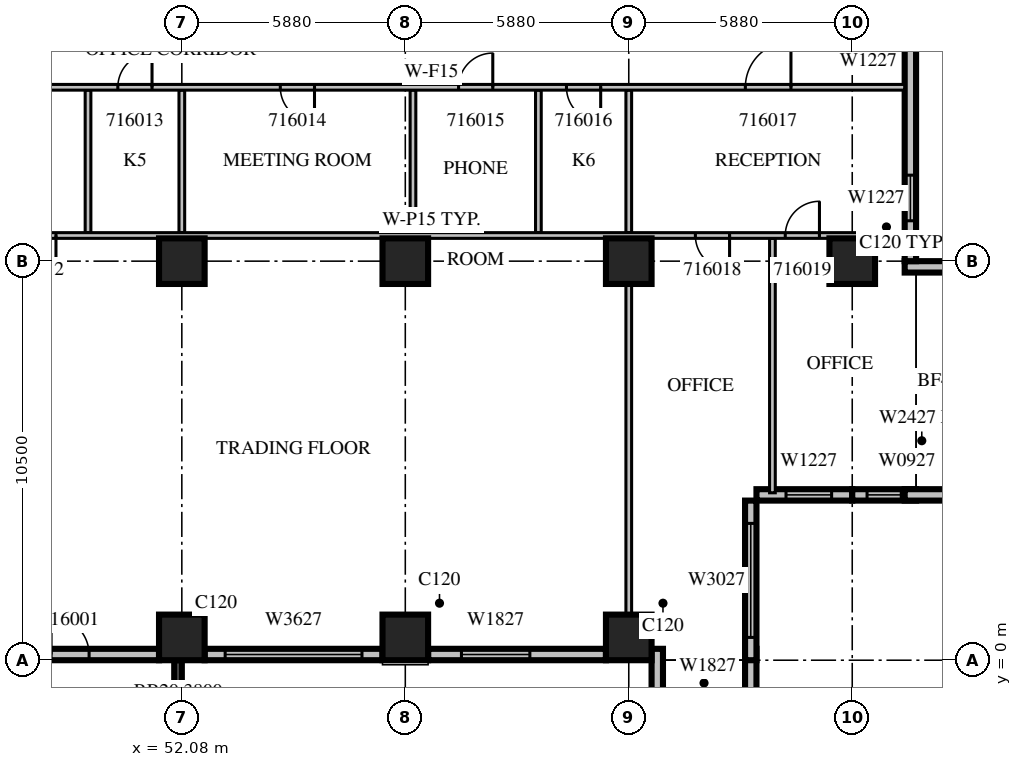
"""IFC4 building model, lengths in metres.
Left out: names, types, materials, properties, quantities, classifications, styles, units other than length and angle.
Written with IfcOpenShell. Run it as: python <this file> out.ifc"""

import sys

from ifc_helpers import new_model, si_unit, direction, frame, frame_2d, origin, origin_2d, place, context, subcontext, project, spatial, rectangle, extrude, source, transform, mapped, element, fill, save


model = new_model("IFC4")
c1 = context("Model", 3, precision=1e-05, world=origin(), true_north=direction((0.0, 1.0)))
c2 = subcontext(c1, "Body", "Model", "MODEL_VIEW")
j1 = project(units=[si_unit("LENGTHUNIT", "METRE"), si_unit("PLANEANGLEUNIT", "RADIAN")], contexts=[c1])
p1 = place(None, origin())
s1 = spatial("IfcSite", under=j1, at=p1, CompositionType="ELEMENT")
p2 = place(p1, origin())
s2 = spatial("IfcBuilding", under=s1, at=p2, CompositionType="ELEMENT")
p3 = place(p2, frame((0.0, 0.0, 78.3)))
s3 = spatial("IfcBuildingStorey", under=s2, at=p3, CompositionType="ELEMENT", Elevation=78.3)
m1 = source(origin(), c2, "Body", "SweptSolid", [
    extrude(rectangle(XDim=1.2, YDim=1.2, at=origin_2d()), origin(), (0.0, 0.0, 1.0), 4.2),
])
for number, where, z_axis, x_axis in (
    (1, (52.08, 0.6, 0.0), (0.0, 0.0, 1.0), (1.0, 0.0, 0.0)),
    (2, (57.96, 0.6, 0.0), (0.0, 0.0, 1.0), (1.0, 0.0, 0.0)),
    (3, (63.84, 0.6, 0.0), (0.0, 0.0, 1.0), (1.0, 0.0, 0.0)),
    (4, (52.08, 10.5, 0.0), (0.0, 0.0, 1.0), (1.0, 0.0, 0.0)),
    (5, (57.96, 10.5, 0.0), (0.0, 0.0, 1.0), (1.0, 0.0, 0.0)),
    (6, (63.84, 10.5, 0.0), (0.0, 0.0, 1.0), (1.0, 0.0, 0.0)),
    (7, (69.72, 10.5, 0.0), (0.0, 0.0, 1.0), (1.0, 0.0, 0.0)),
):
    element("IfcColumn", number, at=place(p3, frame(where, z_axis=z_axis, x_axis=x_axis)), inside=s3, PredefinedType="COLUMN", context=c2, shape_type="MappedRepresentation", body=[
        mapped(m1, transform((0.0, 0.0, 0.0), scale=1.0)),
    ])
m2 = source(origin(), c2, "Body", "SweptSolid", [
    extrude(rectangle(XDim=3.9, YDim=0.2, at=frame_2d((1.95, 0.0))), origin(), (0.0, 0.0, 1.0), 3.8),
])
p4 = place(p3, frame((51.98, 0.0, 0.0), z_axis=(0.0, 0.0, 1.0), x_axis=(0.0, -1.0, 0.0)))
e8 = element("IfcWall", 8, at=p4, inside=s3, PredefinedType="SOLIDWALL", context=c2, shape_type="MappedRepresentation", body=[
    mapped(m2, transform((0.0, 0.0, 0.0), scale=1.0)),
])
m3 = source(origin(), c2, "Body", "SweptSolid", [
    extrude(rectangle(XDim=2.4, YDim=2.7, at=frame_2d((1.2, 1.35))), frame((0.0, 0.11, 0.0), z_axis=(0.0, -1.0, 0.0), x_axis=(1.0, 0.0, 0.0)), (0.0, 0.0, 1.0), 0.22),
])
p5 = place(p4, frame((0.75, 0.0, 0.6)))
e9 = element("IfcOpeningElement", 9, at=p5, cuts=e8, PredefinedType="OPENING", context=c2, shape_type="MappedRepresentation", body=[
    mapped(m3, transform((0.0, 0.0, 0.0), scale=1.0)),
])
m4 = source(origin(), c2, "Body", "SweptSolid", [
    extrude(rectangle(XDim=4.68, YDim=0.3, at=frame_2d((2.34, 0.0))), origin(), (0.0, 0.0, 1.0), 3.8),
])
p6 = place(p3, frame((46.8, 0.15, 0.0), z_axis=(0.0, 0.0, 1.0), x_axis=(1.0, 0.0, 0.0)))
e10 = element("IfcWall", 10, at=p6, inside=s3, PredefinedType="STANDARD", context=c2, shape_type="MappedRepresentation", body=[
    mapped(m4, transform((0.0, 0.0, 0.0), scale=1.0)),
])
m5 = source(origin(), c2, "Body", "SweptSolid", [
    extrude(rectangle(XDim=1.0, YDim=2.1, at=frame_2d((0.5, 1.05))), frame((0.0, 0.16, 0.0), z_axis=(0.0, -1.0, 0.0), x_axis=(1.0, 0.0, 0.0)), (0.0, 0.0, 1.0), 0.32),
])
p7 = place(p6, frame((1.84, 0.0, 0.0)))
e11 = element("IfcOpeningElement", 11, at=p7, cuts=e10, PredefinedType="OPENING", context=c2, shape_type="MappedRepresentation", body=[
    mapped(m5, transform((0.0, 0.0, 0.0), scale=1.0)),
])
p8 = place(p3, frame((52.68, 0.15, 0.0), z_axis=(0.0, 0.0, 1.0), x_axis=(1.0, 0.0, 0.0)))
e12 = element("IfcWall", 12, at=p8, inside=s3, PredefinedType="STANDARD", context=c2, shape_type="MappedRepresentation", body=[
    mapped(m4, transform((0.0, 0.0, 0.0), scale=1.0)),
])
m6 = source(origin(), c2, "Body", "SweptSolid", [
    extrude(rectangle(XDim=3.6, YDim=2.7, at=frame_2d((1.8, 1.35))), frame((0.0, 0.16, 0.0), z_axis=(0.0, -1.0, 0.0), x_axis=(1.0, 0.0, 0.0)), (0.0, 0.0, 1.0), 0.32),
])
p9 = place(p8, frame((0.54, 0.0, 0.6)))
e13 = element("IfcOpeningElement", 13, at=p9, cuts=e12, PredefinedType="OPENING", context=c2, shape_type="MappedRepresentation", body=[
    mapped(m6, transform((0.0, 0.0, 0.0), scale=1.0)),
])
p10 = place(p3, frame((58.56, 0.15, 0.0), z_axis=(0.0, 0.0, 1.0), x_axis=(1.0, 0.0, 0.0)))
e14 = element("IfcWall", 14, at=p10, inside=s3, PredefinedType="STANDARD", context=c2, shape_type="MappedRepresentation", body=[
    mapped(m4, transform((0.0, 0.0, 0.0), scale=1.0)),
])
m7 = source(origin(), c2, "Body", "SweptSolid", [
    extrude(rectangle(XDim=1.8, YDim=2.7, at=frame_2d((0.9, 1.35))), frame((0.0, 0.16, 0.0), z_axis=(0.0, -1.0, 0.0), x_axis=(1.0, 0.0, 0.0)), (0.0, 0.0, 1.0), 0.32),
])
p11 = place(p10, frame((0.877, 0.0, 0.6)))
e15 = element("IfcOpeningElement", 15, at=p11, cuts=e14, PredefinedType="OPENING", context=c2, shape_type="MappedRepresentation", body=[
    mapped(m7, transform((0.0, 0.0, 0.0), scale=1.0)),
])
m8 = source(origin(), c2, "Body", "SweptSolid", [
    extrude(rectangle(XDim=1.2, YDim=0.3, at=frame_2d((0.6, 0.0))), origin(), (0.0, 0.0, 1.0), 3.8),
])
for number, where, z_axis, x_axis in (
    (16, (64.59, 0.3, 0.0), (0.0, 0.0, 1.0), (0.0, -1.0, 0.0)),
    (17, (67.05, 0.3, 0.0), (0.0, 0.0, 1.0), (0.0, -1.0, 0.0)),
):
    element("IfcWall", number, at=place(p3, frame(where, z_axis=z_axis, x_axis=x_axis)), inside=s3, PredefinedType="STANDARD", context=c2, shape_type="MappedRepresentation", body=[
        mapped(m8, transform((0.0, 0.0, 0.0), scale=1.0)),
    ])
m9 = source(origin(), c2, "Body", "SweptSolid", [
    extrude(rectangle(XDim=4.2, YDim=0.3, at=frame_2d((2.1, 0.0))), origin(), (0.0, 0.0, 1.0), 3.8),
])
p12 = place(p3, frame((67.05, 0.0, 0.0), z_axis=(0.0, 0.0, 1.0), x_axis=(0.0, 1.0, 0.0)))
e18 = element("IfcWall", 18, at=p12, inside=s3, PredefinedType="STANDARD", context=c2, shape_type="MappedRepresentation", body=[
    mapped(m9, transform((0.0, 0.0, 0.0), scale=1.0)),
])
m10 = source(origin(), c2, "Body", "SweptSolid", [
    extrude(rectangle(XDim=3.0, YDim=2.7, at=frame_2d((1.5, 1.35))), frame((0.0, 0.16, 0.0), z_axis=(0.0, -1.0, 0.0), x_axis=(1.0, 0.0, 0.0)), (0.0, 0.0, 1.0), 0.32),
])
p13 = place(p12, frame((0.6, 0.0, 0.6)))
e19 = element("IfcOpeningElement", 19, at=p13, cuts=e18, PredefinedType="OPENING", context=c2, shape_type="MappedRepresentation", body=[
    mapped(m10, transform((0.0, 0.0, 0.0), scale=1.0)),
])
m11 = source(origin(), c2, "Body", "SweptSolid", [
    extrude(rectangle(XDim=2.52, YDim=0.3, at=frame_2d((1.26, 0.0))), origin(), (0.0, 0.0, 1.0), 3.8),
])
p14 = place(p3, frame((67.2, 4.35, 0.0), z_axis=(0.0, 0.0, 1.0), x_axis=(1.0, 0.0, 0.0)))
e20 = element("IfcWall", 20, at=p14, inside=s3, PredefinedType="STANDARD", context=c2, shape_type="MappedRepresentation", body=[
    mapped(m11, transform((0.0, 0.0, 0.0), scale=1.0)),
])
m12 = source(origin(), c2, "Body", "SweptSolid", [
    extrude(rectangle(XDim=1.2, YDim=2.7, at=frame_2d((0.6, 1.35))), frame((0.0, 0.16, 0.0), z_axis=(0.0, -1.0, 0.0), x_axis=(1.0, 0.0, 0.0)), (0.0, 0.0, 1.0), 0.32),
])
p15 = place(p14, frame((0.777, 0.0, 0.6)))
e21 = element("IfcOpeningElement", 21, at=p15, cuts=e20, PredefinedType="OPENING", context=c2, shape_type="MappedRepresentation", body=[
    mapped(m12, transform((0.0, 0.0, 0.0), scale=1.0)),
])
m13 = source(origin(), c2, "Body", "SweptSolid", [
    extrude(rectangle(XDim=1.68, YDim=0.3, at=frame_2d((0.84, 0.0))), origin(), (0.0, 0.0, 1.0), 3.8),
])
p16 = place(p3, frame((69.72, 4.35, 0.0), z_axis=(0.0, 0.0, 1.0), x_axis=(1.0, 0.0, 0.0)))
e22 = element("IfcWall", 22, at=p16, inside=s3, PredefinedType="STANDARD", context=c2, shape_type="MappedRepresentation", body=[
    mapped(m13, transform((0.0, 0.0, 0.0), scale=1.0)),
])
m14 = source(origin(), c2, "Body", "SweptSolid", [
    extrude(rectangle(XDim=0.9, YDim=2.7, at=frame_2d((0.45, 1.35))), frame((0.0, 0.16, 0.0), z_axis=(0.0, -1.0, 0.0), x_axis=(1.0, 0.0, 0.0)), (0.0, 0.0, 1.0), 0.32),
])
p17 = place(p16, frame((0.39, 0.0, 0.6)))
e23 = element("IfcOpeningElement", 23, at=p17, cuts=e22, PredefinedType="OPENING", context=c2, shape_type="MappedRepresentation", body=[
    mapped(m14, transform((0.0, 0.0, 0.0), scale=1.0)),
])
for number, where, z_axis, x_axis in (
    (24, (71.1, 4.35, 0.0), (0.0, 0.0, 1.0), (1.0, 0.0, 0.0)),
    (25, (71.1, 10.35, 0.0), (0.0, 0.0, 1.0), (1.0, 0.0, 0.0)),
):
    element("IfcWall", number, at=place(p3, frame(where, z_axis=z_axis, x_axis=x_axis)), inside=s3, PredefinedType="STANDARD", context=c2, shape_type="MappedRepresentation", body=[
        mapped(m8, transform((0.0, 0.0, 0.0), scale=1.0)),
    ])
m15 = source(origin(), c2, "Body", "SweptSolid", [
    extrude(rectangle(XDim=6.3, YDim=0.3, at=frame_2d((3.15, 0.0))), origin(), (0.0, 0.0, 1.0), 3.8),
])
p18 = place(p3, frame((71.25, 10.5, 0.0), z_axis=(0.0, 0.0, 1.0), x_axis=(0.0, 1.0, 0.0)))
e26 = element("IfcWall", 26, at=p18, inside=s3, PredefinedType="STANDARD", context=c2, shape_type="MappedRepresentation", body=[
    mapped(m15, transform((0.0, 0.0, 0.0), scale=1.0)),
])
p19 = place(p18, frame((1.062, 0.0, 0.6)))
e27 = element("IfcOpeningElement", 27, at=p19, cuts=e26, PredefinedType="OPENING", context=c2, shape_type="MappedRepresentation", body=[
    mapped(m12, transform((0.0, 0.0, 0.0), scale=1.0)),
])
m16 = source(origin(), c2, "Body", "SweptSolid", [
    extrude(rectangle(XDim=3.75, YDim=0.15, at=frame_2d((1.875, 0.0))), origin(), (0.0, 0.0, 1.0), 3.8),
])
for number, where, z_axis, x_axis in (
    (28, (49.612, 11.25, 0.0), (0.0, 0.0, 1.0), (0.0, 1.0, 0.0)),
    (29, (52.08, 11.25, 0.0), (0.0, 0.0, 1.0), (0.0, 1.0, 0.0)),
    (30, (58.162, 11.25, 0.0), (0.0, 0.0, 1.0), (0.0, 1.0, 0.0)),
    (31, (61.462, 11.25, 0.0), (0.0, 0.0, 1.0), (0.0, 1.0, 0.0)),
):
    element("IfcWall", number, at=place(p3, frame(where, z_axis=z_axis, x_axis=x_axis)), inside=s3, PredefinedType="PARTITIONING", context=c2, shape_type="MappedRepresentation", body=[
        mapped(m16, transform((0.0, 0.0, 0.0), scale=1.0)),
    ])
m17 = source(origin(), c2, "Body", "SweptSolid", [
    extrude(rectangle(XDim=6.695, YDim=0.15, at=frame_2d((3.348, 0.0))), origin(), (0.0, 0.0, 1.0), 3.8),
])
p20 = place(p3, frame((67.62, 4.405, 0.0), z_axis=(0.0, 0.0, 1.0), x_axis=(0.0, 1.0, 0.0)))
e32 = element("IfcWall", 32, at=p20, inside=s3, PredefinedType="PARTITIONING", context=c2, shape_type="MappedRepresentation", body=[
    mapped(m17, transform((0.0, 0.0, 0.0), scale=1.0)),
])
m18 = source(origin(), c2, "Body", "SweptSolid", [
    extrude(rectangle(XDim=8.702, YDim=0.15, at=frame_2d((4.351, 0.0))), origin(), (0.0, 0.0, 1.0), 3.8),
])
p21 = place(p3, frame((63.84, 1.199, 0.0), z_axis=(0.0, 0.0, 1.0), x_axis=(0.0, 1.0, 0.0)))
e33 = element("IfcWall", 33, at=p21, inside=s3, PredefinedType="PARTITIONING", context=c2, shape_type="MappedRepresentation", body=[
    mapped(m18, transform((0.0, 0.0, 0.0), scale=1.0)),
])
p22 = place(p3, frame((63.84, 11.25, 0.0), z_axis=(0.0, 0.0, 1.0), x_axis=(0.0, 1.0, 0.0)))
e34 = element("IfcWall", 34, at=p22, inside=s3, PredefinedType="PARTITIONING", context=c2, shape_type="MappedRepresentation", body=[
    mapped(m16, transform((0.0, 0.0, 0.0), scale=1.0)),
])
m19 = source(origin(), c2, "Body", "SweptSolid", [
    extrude(rectangle(XDim=24.9, YDim=0.15, at=frame_2d((12.45, 0.0))), origin(), (0.0, 0.0, 1.0), 3.8),
])
p23 = place(p3, frame((71.1, 11.175, 0.0), z_axis=(0.0, 0.0, 1.0), x_axis=(-1.0, 0.0, 0.0)))
e35 = element("IfcWall", 35, at=p23, inside=s3, PredefinedType="PARTITIONING", context=c2, shape_type="MappedRepresentation", body=[
    mapped(m19, transform((0.0, 0.0, 0.0), scale=1.0)),
])
m20 = source(origin(), c2, "Body", "SweptSolid", [
    extrude(rectangle(XDim=1.1, YDim=2.1, at=frame_2d((0.55, 1.05))), frame((0.0, 0.085, 0.0), z_axis=(0.0, -1.0, 0.0), x_axis=(1.0, 0.0, 0.0)), (0.0, 0.0, 1.0), 0.17),
])
p24 = place(p23, frame((22.332, 0.0, 0.0)))
e36 = element("IfcOpeningElement", 36, at=p24, cuts=e35, PredefinedType="OPENING", context=c2, shape_type="MappedRepresentation", body=[
    mapped(m20, transform((0.0, 0.0, 0.0), scale=1.0)),
])
m21 = source(origin(), c2, "Body", "SweptSolid", [
    extrude(rectangle(XDim=0.9, YDim=2.1, at=frame_2d((0.45, 1.05))), frame((0.0, 0.085, 0.0), z_axis=(0.0, -1.0, 0.0), x_axis=(1.0, 0.0, 0.0)), (0.0, 0.0, 1.0), 0.17),
])
p25 = place(p23, frame((4.607, 0.0, 0.0)))
e37 = element("IfcOpeningElement", 37, at=p25, cuts=e35, PredefinedType="OPENING", context=c2, shape_type="MappedRepresentation", body=[
    mapped(m21, transform((0.0, 0.0, 0.0), scale=1.0)),
])
p26 = place(p23, frame((2.243, 0.0, 0.0)))
e38 = element("IfcOpeningElement", 38, at=p26, cuts=e35, PredefinedType="OPENING", context=c2, shape_type="MappedRepresentation", body=[
    mapped(m21, transform((0.0, 0.0, 0.0), scale=1.0)),
])
p27 = place(p3, frame((71.1, 15.075, 0.0), z_axis=(0.0, 0.0, 1.0), x_axis=(-1.0, 0.0, 0.0)))
e39 = element("IfcWall", 39, at=p27, inside=s3, PredefinedType="PARTITIONING", context=c2, shape_type="MappedRepresentation", body=[
    mapped(m19, transform((0.0, 0.0, 0.0), scale=1.0)),
])
p28 = place(p27, frame((22.644, 0.0, 0.0)))
e40 = element("IfcOpeningElement", 40, at=p28, cuts=e39, PredefinedType="OPENING", context=c2, shape_type="MappedRepresentation", body=[
    mapped(m20, transform((0.0, 0.0, 0.0), scale=1.0)),
])
p29 = place(p27, frame((19.804, 0.0, 0.0)))
e41 = element("IfcOpeningElement", 41, at=p29, cuts=e39, PredefinedType="OPENING", context=c2, shape_type="MappedRepresentation", body=[
    mapped(m21, transform((0.0, 0.0, 0.0), scale=1.0)),
])
p30 = place(p27, frame((15.529, 0.0, 0.0)))
e42 = element("IfcOpeningElement", 42, at=p30, cuts=e39, PredefinedType="OPENING", context=c2, shape_type="MappedRepresentation", body=[
    mapped(m21, transform((0.0, 0.0, 0.0), scale=1.0)),
])
p31 = place(p27, frame((10.838, 0.0, 0.0)))
e43 = element("IfcOpeningElement", 43, at=p31, cuts=e39, PredefinedType="OPENING", context=c2, shape_type="MappedRepresentation", body=[
    mapped(m21, transform((0.0, 0.0, 0.0), scale=1.0)),
])
p32 = place(p27, frame((7.999, 0.0, 0.0)))
e44 = element("IfcOpeningElement", 44, at=p32, cuts=e39, PredefinedType="OPENING", context=c2, shape_type="MappedRepresentation", body=[
    mapped(m21, transform((0.0, 0.0, 0.0), scale=1.0)),
])
m22 = source(origin(), c2, "Body", "SweptSolid", [
    extrude(rectangle(XDim=1.2, YDim=2.1, at=frame_2d((0.6, 1.05))), frame((0.0, 0.085, 0.0), z_axis=(0.0, -1.0, 0.0), x_axis=(1.0, 0.0, 0.0)), (0.0, 0.0, 1.0), 0.17),
])
p33 = place(p27, frame((2.993, 0.0, 0.0)))
e45 = element("IfcOpeningElement", 45, at=p33, cuts=e39, PredefinedType="OPENING", context=c2, shape_type="MappedRepresentation", body=[
    mapped(m22, transform((0.0, 0.0, 0.0), scale=1.0)),
])
m23 = source(origin(), c2, "Body", "SweptSolid", [
    extrude(rectangle(XDim=3.6, YDim=2.7, at=frame_2d((1.8, 1.35))), frame((0.0, 0.03, 0.0), z_axis=(0.0, -1.0, 0.0), x_axis=(1.0, 0.0, 0.0)), (0.0, 0.0, 1.0), 0.06),
])
p34 = place(p9, origin())
e46 = element("IfcWindow", 46, at=p34, inside=s3, PartitioningType="SINGLE_PANEL", PredefinedType="WINDOW", context=c2, shape_type="MappedRepresentation", body=[
    mapped(m23, transform((0.0, 0.0, 0.0), scale=1.0)),
])
fill(e13, e46)
m24 = source(origin(), c2, "Body", "SweptSolid", [
    extrude(rectangle(XDim=1.8, YDim=2.7, at=frame_2d((0.9, 1.35))), frame((0.0, 0.03, 0.0), z_axis=(0.0, -1.0, 0.0), x_axis=(1.0, 0.0, 0.0)), (0.0, 0.0, 1.0), 0.06),
])
p35 = place(p11, origin())
e47 = element("IfcWindow", 47, at=p35, inside=s3, PartitioningType="SINGLE_PANEL", PredefinedType="WINDOW", context=c2, shape_type="MappedRepresentation", body=[
    mapped(m24, transform((0.0, 0.0, 0.0), scale=1.0)),
])
fill(e15, e47)
m25 = source(origin(), c2, "Body", "SweptSolid", [
    extrude(rectangle(XDim=3.0, YDim=2.7, at=frame_2d((1.5, 1.35))), frame((0.0, 0.03, 0.0), z_axis=(0.0, -1.0, 0.0), x_axis=(1.0, 0.0, 0.0)), (0.0, 0.0, 1.0), 0.06),
])
p36 = place(p13, origin())
e48 = element("IfcWindow", 48, at=p36, inside=s3, PartitioningType="SINGLE_PANEL", PredefinedType="WINDOW", context=c2, shape_type="MappedRepresentation", body=[
    mapped(m25, transform((0.0, 0.0, 0.0), scale=1.0)),
])
fill(e19, e48)
m26 = source(origin(), c2, "Body", "SweptSolid", [
    extrude(rectangle(XDim=1.2, YDim=2.7, at=frame_2d((0.6, 1.35))), frame((0.0, 0.03, 0.0), z_axis=(0.0, -1.0, 0.0), x_axis=(1.0, 0.0, 0.0)), (0.0, 0.0, 1.0), 0.06),
])
p37 = place(p15, origin())
e49 = element("IfcWindow", 49, at=p37, inside=s3, PartitioningType="SINGLE_PANEL", PredefinedType="WINDOW", context=c2, shape_type="MappedRepresentation", body=[
    mapped(m26, transform((0.0, 0.0, 0.0), scale=1.0)),
])
fill(e21, e49)
m27 = source(origin(), c2, "Body", "SweptSolid", [
    extrude(rectangle(XDim=0.9, YDim=2.7, at=frame_2d((0.45, 1.35))), frame((0.0, 0.03, 0.0), z_axis=(0.0, -1.0, 0.0), x_axis=(1.0, 0.0, 0.0)), (0.0, 0.0, 1.0), 0.06),
])
p38 = place(p17, origin())
e50 = element("IfcWindow", 50, at=p38, inside=s3, PartitioningType="SINGLE_PANEL", PredefinedType="WINDOW", context=c2, shape_type="MappedRepresentation", body=[
    mapped(m27, transform((0.0, 0.0, 0.0), scale=1.0)),
])
fill(e23, e50)
p39 = place(p19, origin())
e51 = element("IfcWindow", 51, at=p39, inside=s3, PartitioningType="SINGLE_PANEL", PredefinedType="WINDOW", context=c2, shape_type="MappedRepresentation", body=[
    mapped(m26, transform((0.0, 0.0, 0.0), scale=1.0)),
])
fill(e27, e51)
m28 = source(origin(), c2, "Body", "SweptSolid", [
    extrude(rectangle(XDim=1.1, YDim=2.1, at=frame_2d((0.55, 1.05))), frame((0.0, 0.025, 0.0), z_axis=(0.0, -1.0, 0.0), x_axis=(1.0, 0.0, 0.0)), (0.0, 0.0, 1.0), 0.05),
])
p40 = place(p24, origin())
e52 = element("IfcDoor", 52, at=p40, inside=s3, OperationType="SINGLE_SWING_LEFT", PredefinedType="DOOR", context=c2, shape_type="MappedRepresentation", body=[
    mapped(m28, transform((0.0, 0.0, 0.0), scale=1.0)),
])
fill(e36, e52)
m29 = source(origin(), c2, "Body", "SweptSolid", [
    extrude(rectangle(XDim=0.9, YDim=2.1, at=frame_2d((0.45, 1.05))), frame((0.0, 0.025, 0.0), z_axis=(0.0, -1.0, 0.0), x_axis=(1.0, 0.0, 0.0)), (0.0, 0.0, 1.0), 0.05),
])
p41 = place(p29, origin())
e53 = element("IfcDoor", 53, at=p41, inside=s3, OperationType="SINGLE_SWING_RIGHT", PredefinedType="DOOR", context=c2, shape_type="MappedRepresentation", body=[
    mapped(m29, transform((0.0, 0.0, 0.0), scale=1.0)),
])
fill(e41, e53)
p42 = place(p30, origin())
e54 = element("IfcDoor", 54, at=p42, inside=s3, OperationType="SINGLE_SWING_LEFT", PredefinedType="DOOR", context=c2, shape_type="MappedRepresentation", body=[
    mapped(m29, transform((0.0, 0.0, 0.0), scale=1.0)),
])
fill(e42, e54)
p43 = place(p31, origin())
e55 = element("IfcDoor", 55, at=p43, inside=s3, OperationType="SINGLE_SWING_RIGHT", PredefinedType="DOOR", context=c2, shape_type="MappedRepresentation", body=[
    mapped(m29, transform((0.0, 0.0, 0.0), scale=1.0)),
])
fill(e43, e55)
p44 = place(p32, origin())
e56 = element("IfcDoor", 56, at=p44, inside=s3, OperationType="SINGLE_SWING_LEFT", PredefinedType="DOOR", context=c2, shape_type="MappedRepresentation", body=[
    mapped(m29, transform((0.0, 0.0, 0.0), scale=1.0)),
])
fill(e44, e56)
m30 = source(origin(), c2, "Body", "SweptSolid", [
    extrude(rectangle(XDim=1.2, YDim=2.1, at=frame_2d((0.6, 1.05))), frame((0.0, 0.025, 0.0), z_axis=(0.0, -1.0, 0.0), x_axis=(1.0, 0.0, 0.0)), (0.0, 0.0, 1.0), 0.05),
])
p45 = place(p33, origin())
e57 = element("IfcDoor", 57, at=p45, inside=s3, OperationType="SINGLE_SWING_RIGHT", PredefinedType="DOOR", context=c2, shape_type="MappedRepresentation", body=[
    mapped(m30, transform((0.0, 0.0, 0.0), scale=1.0)),
])
fill(e45, e57)
p46 = place(p25, origin())
e58 = element("IfcDoor", 58, at=p46, inside=s3, OperationType="SINGLE_SWING_LEFT", PredefinedType="DOOR", context=c2, shape_type="MappedRepresentation", body=[
    mapped(m29, transform((0.0, 0.0, 0.0), scale=1.0)),
])
fill(e37, e58)
p47 = place(p26, origin())
e59 = element("IfcDoor", 59, at=p47, inside=s3, OperationType="SINGLE_SWING_RIGHT", PredefinedType="DOOR", context=c2, shape_type="MappedRepresentation", body=[
    mapped(m29, transform((0.0, 0.0, 0.0), scale=1.0)),
])
fill(e38, e59)
m31 = source(origin(), c2, "Body", "SweptSolid", [
    extrude(rectangle(XDim=1.0, YDim=2.1, at=frame_2d((0.5, 1.05))), frame((0.0, 0.025, 0.0), z_axis=(0.0, -1.0, 0.0), x_axis=(1.0, 0.0, 0.0)), (0.0, 0.0, 1.0), 0.05),
])
p48 = place(p7, origin())
e60 = element("IfcDoor", 60, at=p48, inside=s3, OperationType="SINGLE_SWING_LEFT", PredefinedType="DOOR", context=c2, shape_type="MappedRepresentation", body=[
    mapped(m31, transform((0.0, 0.0, 0.0), scale=1.0)),
])
fill(e11, e60)
save(model, sys.argv[1])
